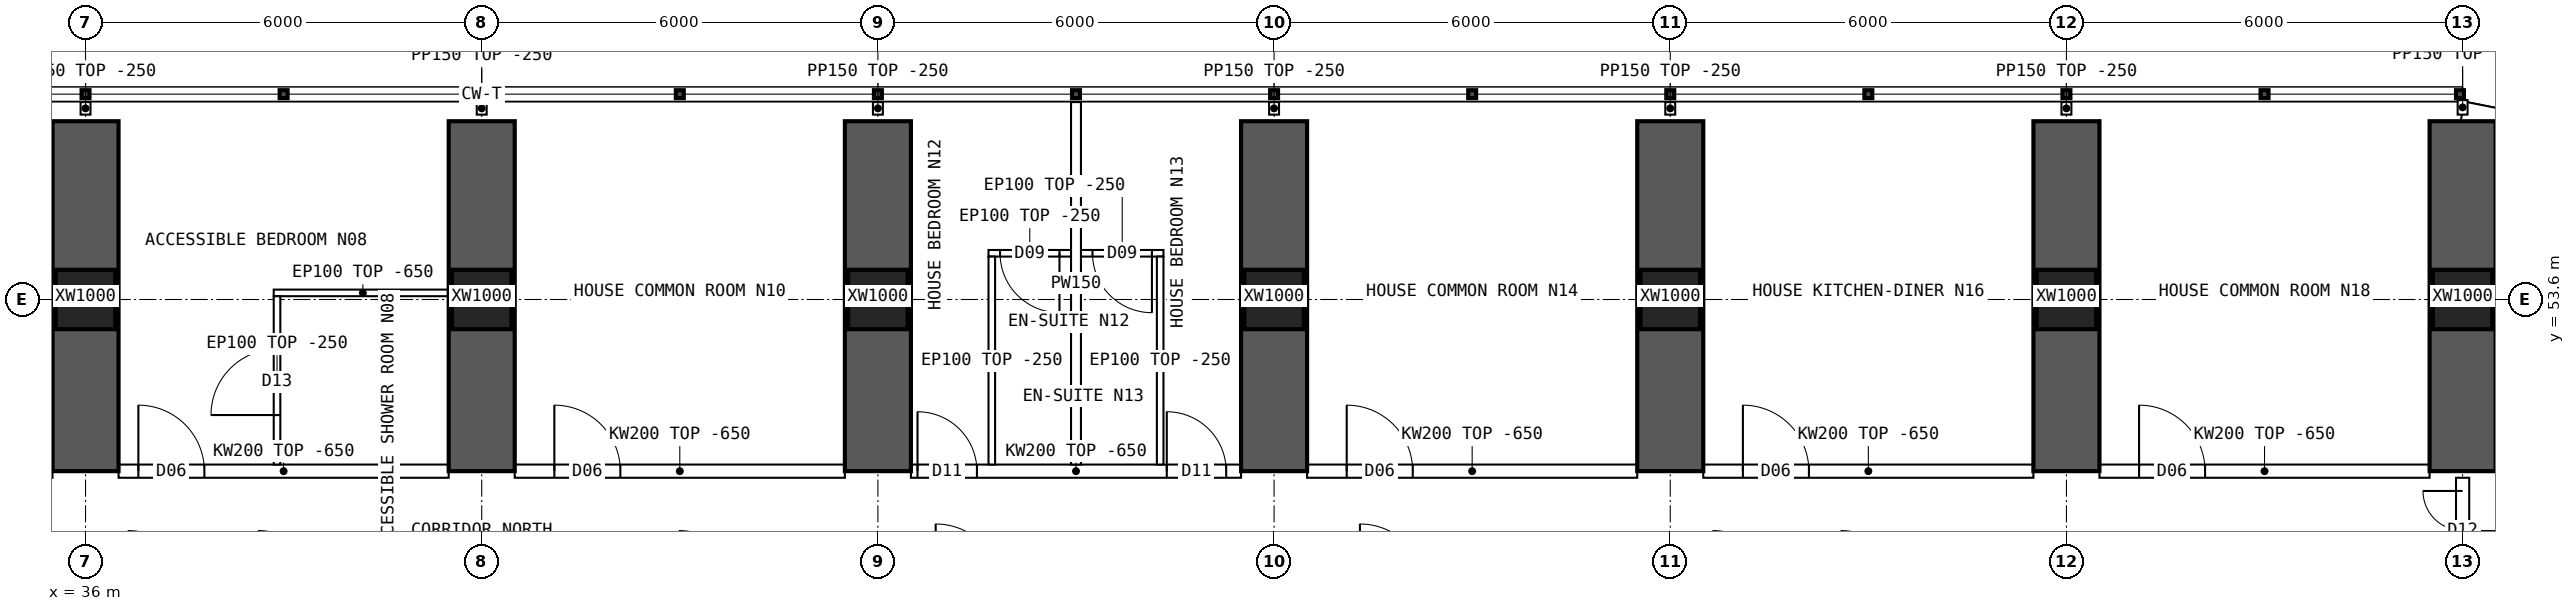
"""IFC4 building model, lengths in metres.
Left out: names, types, materials, properties, quantities, classifications, styles, units other than length and angle.
Written with IfcOpenShell. Run it as: python <this file> out.ifc"""

import sys

from ifc_helpers import new_model, si_unit, direction, frame, frame_2d, origin, origin_2d, place, context, subcontext, project, spatial, polyline, rectangle, hollow_rectangle, outline, extrude, element, fill, save


model = new_model("IFC4")
c1 = context("Model", 3, precision=1e-05, world=origin(), true_north=direction((0.0, 1.0)))
c2 = subcontext(c1, "Body", "Model", "MODEL_VIEW")
j1 = project(units=[si_unit("LENGTHUNIT", "METRE"), si_unit("PLANEANGLEUNIT", "RADIAN")], contexts=[c1])
p1 = place(None, origin())
s1 = spatial("IfcSite", under=j1, at=p1, CompositionType="ELEMENT")
p2 = place(p1, origin())
s2 = spatial("IfcBuilding", under=s1, at=p2, CompositionType="ELEMENT")
p3 = place(p2, frame((0.0, 0.0, 53.95)))
s3 = spatial("IfcBuildingStorey", under=s2, at=p3, CompositionType="ELEMENT", Elevation=53.95)
for number, where, z_axis, x_axis in (
    (1, (36.0, 53.6, 0.0), (0.0, 0.0, 1.0), (1.0, 0.0, 0.0)),
    (2, (42.0, 53.6, 0.0), (0.0, 0.0, 1.0), (1.0, 0.0, 0.0)),
    (3, (48.0, 53.6, 0.0), (0.0, 0.0, 1.0), (1.0, 0.0, 0.0)),
    (4, (54.0, 53.6, 0.0), (0.0, 0.0, 1.0), (1.0, 0.0, 0.0)),
    (5, (60.0, 53.6, 0.0), (0.0, 0.0, 1.0), (1.0, 0.0, 0.0)),
    (6, (66.0, 53.6, 0.0), (0.0, 0.0, 1.0), (1.0, 0.0, 0.0)),
    (7, (72.0, 53.6, 0.0), (0.0, 0.0, 1.0), (1.0, 0.0, 0.0)),
):
    element("IfcColumn", number, at=place(p3, frame(where, z_axis=z_axis, x_axis=x_axis)), inside=s3, PredefinedType="COLUMN", context=c2, shape_type="SweptSolid", body=[
        extrude(hollow_rectangle(XDim=0.9, YDim=0.9, WallThickness=0.09, at=origin_2d()), origin(), (0.0, 0.0, 1.0), 3.75),
    ])
for number, where, z_axis, x_axis in (
    (8, (36.0, 51.0, 0.0), (0.0, 0.0, 1.0), (0.0, 1.0, 0.0)),
    (9, (42.0, 51.0, 0.0), (0.0, 0.0, 1.0), (0.0, 1.0, 0.0)),
    (10, (48.0, 51.0, 0.0), (0.0, 0.0, 1.0), (0.0, 1.0, 0.0)),
    (11, (54.0, 51.0, 0.0), (0.0, 0.0, 1.0), (0.0, 1.0, 0.0)),
    (12, (60.0, 51.0, 0.0), (0.0, 0.0, 1.0), (0.0, 1.0, 0.0)),
    (13, (66.0, 51.0, 0.0), (0.0, 0.0, 1.0), (0.0, 1.0, 0.0)),
    (14, (72.0, 51.0, 0.0), (0.0, 0.0, 1.0), (0.0, 1.0, 0.0)),
):
    element("IfcWall", number, at=place(p3, frame(where, z_axis=z_axis, x_axis=x_axis)), inside=s3, PredefinedType="SHEAR", context=c2, shape_type="SweptSolid", body=[
        extrude(rectangle(XDim=5.3, YDim=1.0, at=frame_2d((2.65, 0.0))), origin(), (0.0, 0.0, 1.0), 3.75),
    ])
p4 = place(p3, frame((75.157, 55.822, 0.0), z_axis=(0.0, 0.0, 1.0), x_axis=(-0.980787251524, 0.195080412259, 0.0)))
e15 = element("IfcWall", 15, at=p4, inside=s3, PredefinedType="SOLIDWALL", context=c2, shape_type="SweptSolid", body=[
    extrude(outline(polyline([(-0.03, -0.15), (3.249, -0.15), (3.189, 0.15), (0.03, 0.15), (-0.03, -0.15)])), origin(), (0.0, 0.0, 1.0), 3.5),
])
p5 = place(p4, frame((0.909, 0.0, 0.9)))
e16 = element("IfcOpeningElement", 16, at=p5, cuts=e15, PredefinedType="OPENING", context=c2, shape_type="SweptSolid", body=[
    extrude(rectangle(XDim=1.4, YDim=1.8, at=frame_2d((0.7, 0.9))), frame((0.0, 0.16, 0.0), z_axis=(0.0, -1.0, 0.0), x_axis=(1.0, 0.0, 0.0)), (0.0, 0.0, 1.0), 0.32),
])
p6 = place(p3, frame((36.5, 51.0, 0.0), z_axis=(0.0, 0.0, 1.0), x_axis=(1.0, 0.0, 0.0)))
e17 = element("IfcWall", 17, at=p6, inside=s3, PredefinedType="SOLIDWALL", context=c2, shape_type="SweptSolid", body=[
    extrude(outline(polyline([(0.0, 0.0), (5.0, 0.0), (5.0, 3.1), (0.0, 3.1), (0.0, 0.0)])), frame((0.0, 0.1, 0.0), z_axis=(0.0, -1.0, 0.0), x_axis=(1.0, 0.0, 0.0)), (0.0, 0.0, 1.0), 0.2),
])
p7 = place(p6, frame((0.3, 0.0, 0.0)))
e18 = element("IfcOpeningElement", 18, at=p7, cuts=e17, PredefinedType="OPENING", context=c2, shape_type="SweptSolid", body=[
    extrude(rectangle(XDim=1.0, YDim=2.1, at=frame_2d((0.5, 1.05))), frame((0.0, 0.11, 0.0), z_axis=(0.0, -1.0, 0.0), x_axis=(1.0, 0.0, 0.0)), (0.0, 0.0, 1.0), 0.22),
])
p8 = place(p3, frame((42.5, 51.0, 0.0), z_axis=(0.0, 0.0, 1.0), x_axis=(1.0, 0.0, 0.0)))
e19 = element("IfcWall", 19, at=p8, inside=s3, PredefinedType="SOLIDWALL", context=c2, shape_type="SweptSolid", body=[
    extrude(outline(polyline([(0.0, 0.0), (5.0, 0.0), (5.0, 3.1), (0.0, 3.1), (0.0, 0.0)])), frame((0.0, 0.1, 0.0), z_axis=(0.0, -1.0, 0.0), x_axis=(1.0, 0.0, 0.0)), (0.0, 0.0, 1.0), 0.2),
])
p9 = place(p8, frame((0.6, 0.0, 0.0)))
e20 = element("IfcOpeningElement", 20, at=p9, cuts=e19, PredefinedType="OPENING", context=c2, shape_type="SweptSolid", body=[
    extrude(rectangle(XDim=1.0, YDim=2.1, at=frame_2d((0.5, 1.05))), frame((0.0, 0.11, 0.0), z_axis=(0.0, -1.0, 0.0), x_axis=(1.0, 0.0, 0.0)), (0.0, 0.0, 1.0), 0.22),
])
p10 = place(p3, frame((48.5, 51.0, 0.0), z_axis=(0.0, 0.0, 1.0), x_axis=(1.0, 0.0, 0.0)))
e21 = element("IfcWall", 21, at=p10, inside=s3, PredefinedType="SOLIDWALL", context=c2, shape_type="SweptSolid", body=[
    extrude(outline(polyline([(0.0, 0.0), (5.0, 0.0), (5.0, 3.1), (0.0, 3.1), (0.0, 0.0)])), frame((0.0, 0.1, 0.0), z_axis=(0.0, -1.0, 0.0), x_axis=(1.0, 0.0, 0.0)), (0.0, 0.0, 1.0), 0.2),
])
p11 = place(p10, frame((0.1, 0.0, 0.0)))
e22 = element("IfcOpeningElement", 22, at=p11, cuts=e21, PredefinedType="OPENING", context=c2, shape_type="SweptSolid", body=[
    extrude(rectangle(XDim=0.9, YDim=2.1, at=frame_2d((0.45, 1.05))), frame((0.0, 0.11, 0.0), z_axis=(0.0, -1.0, 0.0), x_axis=(1.0, 0.0, 0.0)), (0.0, 0.0, 1.0), 0.22),
])
p12 = place(p10, frame((3.875, 0.0, 0.0)))
e23 = element("IfcOpeningElement", 23, at=p12, cuts=e21, PredefinedType="OPENING", context=c2, shape_type="SweptSolid", body=[
    extrude(rectangle(XDim=0.9, YDim=2.1, at=frame_2d((0.45, 1.05))), frame((0.0, 0.11, 0.0), z_axis=(0.0, -1.0, 0.0), x_axis=(1.0, 0.0, 0.0)), (0.0, 0.0, 1.0), 0.22),
])
p13 = place(p3, frame((54.5, 51.0, 0.0), z_axis=(0.0, 0.0, 1.0), x_axis=(1.0, 0.0, 0.0)))
e24 = element("IfcWall", 24, at=p13, inside=s3, PredefinedType="SOLIDWALL", context=c2, shape_type="SweptSolid", body=[
    extrude(outline(polyline([(0.0, 0.0), (5.0, 0.0), (5.0, 3.1), (0.0, 3.1), (0.0, 0.0)])), frame((0.0, 0.1, 0.0), z_axis=(0.0, -1.0, 0.0), x_axis=(1.0, 0.0, 0.0)), (0.0, 0.0, 1.0), 0.2),
])
p14 = place(p13, frame((0.6, 0.0, 0.0)))
e25 = element("IfcOpeningElement", 25, at=p14, cuts=e24, PredefinedType="OPENING", context=c2, shape_type="SweptSolid", body=[
    extrude(rectangle(XDim=1.0, YDim=2.1, at=frame_2d((0.5, 1.05))), frame((0.0, 0.11, 0.0), z_axis=(0.0, -1.0, 0.0), x_axis=(1.0, 0.0, 0.0)), (0.0, 0.0, 1.0), 0.22),
])
p15 = place(p3, frame((60.5, 51.0, 0.0), z_axis=(0.0, 0.0, 1.0), x_axis=(1.0, 0.0, 0.0)))
e26 = element("IfcWall", 26, at=p15, inside=s3, PredefinedType="SOLIDWALL", context=c2, shape_type="SweptSolid", body=[
    extrude(outline(polyline([(0.0, 0.0), (5.0, 0.0), (5.0, 3.1), (0.0, 3.1), (0.0, 0.0)])), frame((0.0, 0.1, 0.0), z_axis=(0.0, -1.0, 0.0), x_axis=(1.0, 0.0, 0.0)), (0.0, 0.0, 1.0), 0.2),
])
p16 = place(p15, frame((0.6, 0.0, 0.0)))
e27 = element("IfcOpeningElement", 27, at=p16, cuts=e26, PredefinedType="OPENING", context=c2, shape_type="SweptSolid", body=[
    extrude(rectangle(XDim=1.0, YDim=2.1, at=frame_2d((0.5, 1.05))), frame((0.0, 0.11, 0.0), z_axis=(0.0, -1.0, 0.0), x_axis=(1.0, 0.0, 0.0)), (0.0, 0.0, 1.0), 0.22),
])
p17 = place(p3, frame((66.5, 51.0, 0.0), z_axis=(0.0, 0.0, 1.0), x_axis=(1.0, 0.0, 0.0)))
e28 = element("IfcWall", 28, at=p17, inside=s3, PredefinedType="SOLIDWALL", context=c2, shape_type="SweptSolid", body=[
    extrude(outline(polyline([(0.0, 0.0), (5.0, 0.0), (5.0, 3.1), (0.0, 3.1), (0.0, 0.0)])), frame((0.0, 0.1, 0.0), z_axis=(0.0, -1.0, 0.0), x_axis=(1.0, 0.0, 0.0)), (0.0, 0.0, 1.0), 0.2),
])
p18 = place(p17, frame((0.6, 0.0, 0.0)))
e29 = element("IfcOpeningElement", 29, at=p18, cuts=e28, PredefinedType="OPENING", context=c2, shape_type="SweptSolid", body=[
    extrude(rectangle(XDim=1.0, YDim=2.1, at=frame_2d((0.5, 1.05))), frame((0.0, 0.11, 0.0), z_axis=(0.0, -1.0, 0.0), x_axis=(1.0, 0.0, 0.0)), (0.0, 0.0, 1.0), 0.22),
])
p19 = place(p3, frame((38.85, 53.7, 0.0), z_axis=(0.0, 0.0, 1.0), x_axis=(1.0, 0.0, 0.0)))
e30 = element("IfcWall", 30, at=p19, inside=s3, PredefinedType="PARTITIONING", context=c2, shape_type="SweptSolid", body=[
    extrude(outline(polyline([(0.0, 0.0), (2.7, 0.0), (2.7, 3.1), (0.0, 3.1), (0.0, 0.0)])), frame((0.0, 0.05, 0.0), z_axis=(0.0, -1.0, 0.0), x_axis=(1.0, 0.0, 0.0)), (0.0, 0.0, 1.0), 0.1),
])
p20 = place(p3, frame((38.9, 53.65, 0.0), z_axis=(0.0, 0.0, 1.0), x_axis=(0.0, -1.0, 0.0)))
e31 = element("IfcWall", 31, at=p20, inside=s3, PredefinedType="PARTITIONING", context=c2, shape_type="SweptSolid", body=[
    extrude(outline(polyline([(0.0, 0.0), (2.55, 0.0), (2.55, 3.1), (2.502, 3.1), (2.5, 3.5), (0.252, 3.5), (0.25, 3.1), (0.0, 3.1), (0.0, 0.0)])), frame((0.0, 0.05, 0.0), z_axis=(0.0, -1.0, 0.0), x_axis=(1.0, 0.0, 0.0)), (0.0, 0.0, 1.0), 0.1),
])
p21 = place(p20, frame((0.8, 0.0, 0.0)))
e32 = element("IfcOpeningElement", 32, at=p21, cuts=e31, PredefinedType="OPENING", context=c2, shape_type="SweptSolid", body=[
    extrude(rectangle(XDim=1.0, YDim=2.1, at=frame_2d((0.5, 1.05))), frame((0.0, 0.06, 0.0), z_axis=(0.0, -1.0, 0.0), x_axis=(1.0, 0.0, 0.0)), (0.0, 0.0, 1.0), 0.12),
])
p22 = place(p3, frame((51.0, 56.59, 0.0), z_axis=(0.0, 0.0, 1.0), x_axis=(0.0, -1.0, 0.0)))
e33 = element("IfcWall", 33, at=p22, inside=s3, PredefinedType="PARTITIONING", context=c2, shape_type="SweptSolid", body=[
    extrude(outline(polyline([(0.0, 0.0), (5.49, 0.0), (5.49, 3.1), (5.442, 3.1), (5.44, 3.5), (3.192, 3.5), (3.19, 3.1), (2.792, 3.1), (2.79, 3.5), (0.0, 3.5), (0.0, 0.0)])), frame((0.0, 0.075, 0.0), z_axis=(0.0, -1.0, 0.0), x_axis=(1.0, 0.0, 0.0)), (0.0, 0.0, 1.0), 0.15),
])
p23 = place(p3, frame((49.675, 54.3, 0.0), z_axis=(0.0, 0.0, 1.0), x_axis=(1.0, 0.0, 0.0)))
e34 = element("IfcWall", 34, at=p23, inside=s3, PredefinedType="PARTITIONING", context=c2, shape_type="SweptSolid", body=[
    extrude(rectangle(XDim=1.25, YDim=0.1, at=frame_2d((0.625, 0.0))), origin(), (0.0, 0.0, 1.0), 3.5),
])
p24 = place(p23, frame((0.175, 0.0, 0.0)))
e35 = element("IfcOpeningElement", 35, at=p24, cuts=e34, PredefinedType="OPENING", context=c2, shape_type="SweptSolid", body=[
    extrude(rectangle(XDim=0.9, YDim=2.1, at=frame_2d((0.45, 1.05))), frame((0.0, 0.06, 0.0), z_axis=(0.0, -1.0, 0.0), x_axis=(1.0, 0.0, 0.0)), (0.0, 0.0, 1.0), 0.12),
])
p25 = place(p3, frame((49.725, 54.25, 0.0), z_axis=(0.0, 0.0, 1.0), x_axis=(0.0, -1.0, 0.0)))
e36 = element("IfcWall", 36, at=p25, inside=s3, PredefinedType="PARTITIONING", context=c2, shape_type="SweptSolid", body=[
    extrude(outline(polyline([(0.0, 0.0), (3.15, 0.0), (3.15, 3.1), (3.102, 3.1), (3.1, 3.5), (0.852, 3.5), (0.85, 3.1), (0.452, 3.1), (0.45, 3.5), (0.0, 3.5), (0.0, 0.0)])), frame((0.0, 0.05, 0.0), z_axis=(0.0, -1.0, 0.0), x_axis=(1.0, 0.0, 0.0)), (0.0, 0.0, 1.0), 0.1),
])
p26 = place(p3, frame((51.075, 54.3, 0.0), z_axis=(0.0, 0.0, 1.0), x_axis=(1.0, 0.0, 0.0)))
e37 = element("IfcWall", 37, at=p26, inside=s3, PredefinedType="PARTITIONING", context=c2, shape_type="SweptSolid", body=[
    extrude(rectangle(XDim=1.25, YDim=0.1, at=frame_2d((0.625, 0.0))), origin(), (0.0, 0.0, 1.0), 3.5),
])
p27 = place(p26, frame((0.175, 0.0, 0.0)))
e38 = element("IfcOpeningElement", 38, at=p27, cuts=e37, PredefinedType="OPENING", context=c2, shape_type="SweptSolid", body=[
    extrude(rectangle(XDim=0.9, YDim=2.1, at=frame_2d((0.45, 1.05))), frame((0.0, 0.06, 0.0), z_axis=(0.0, -1.0, 0.0), x_axis=(1.0, 0.0, 0.0)), (0.0, 0.0, 1.0), 0.12),
])
p28 = place(p3, frame((52.275, 54.25, 0.0), z_axis=(0.0, 0.0, 1.0), x_axis=(0.0, -1.0, 0.0)))
e39 = element("IfcWall", 39, at=p28, inside=s3, PredefinedType="PARTITIONING", context=c2, shape_type="SweptSolid", body=[
    extrude(outline(polyline([(0.0, 0.0), (3.15, 0.0), (3.15, 3.1), (3.102, 3.1), (3.1, 3.5), (0.852, 3.5), (0.85, 3.1), (0.452, 3.1), (0.45, 3.5), (0.0, 3.5), (0.0, 0.0)])), frame((0.0, 0.05, 0.0), z_axis=(0.0, -1.0, 0.0), x_axis=(1.0, 0.0, 0.0)), (0.0, 0.0, 1.0), 0.1),
])
p29 = place(p3, frame((72.0, 49.3, 0.0), z_axis=(0.0, 0.0, 1.0), x_axis=(0.0, 1.0, 0.0)))
e40 = element("IfcWall", 40, at=p29, inside=s3, PredefinedType="SOLIDWALL", context=c2, shape_type="SweptSolid", body=[
    extrude(outline(polyline([(0.0, 0.0), (1.6, 0.0), (1.6, 3.05), (0.0, 3.05), (0.0, 0.0)])), frame((0.0, 0.1, 0.0), z_axis=(0.0, -1.0, 0.0), x_axis=(1.0, 0.0, 0.0)), (0.0, 0.0, 1.0), 0.2),
])
p30 = place(p29, frame((0.2, 0.0, 0.0)))
e41 = element("IfcOpeningElement", 41, at=p30, cuts=e40, PredefinedType="OPENING", context=c2, shape_type="SweptSolid", body=[
    extrude(rectangle(XDim=1.2, YDim=2.1, at=frame_2d((0.6, 1.05))), frame((0.0, 0.11, 0.0), z_axis=(0.0, -1.0, 0.0), x_axis=(1.0, 0.0, 0.0)), (0.0, 0.0, 1.0), 0.22),
])
for number, where, z_axis, x_axis in (
    (42, (36.0, 56.4, 0.0), (0.0, 0.0, 1.0), (0.0, 1.0, 0.0)),
    (43, (42.0, 56.4, 0.0), (0.0, 0.0, 1.0), (0.0, 1.0, 0.0)),
    (44, (48.0, 56.4, 0.0), (0.0, 0.0, 1.0), (0.0, 1.0, 0.0)),
    (45, (54.0, 56.4, 0.0), (0.0, 0.0, 1.0), (0.0, 1.0, 0.0)),
    (46, (60.0, 56.4, 0.0), (0.0, 0.0, 1.0), (0.0, 1.0, 0.0)),
    (47, (66.0, 56.4, 0.0), (0.0, 0.0, 1.0), (0.0, 1.0, 0.0)),
):
    element("IfcWall", number, at=place(p3, frame(where, z_axis=z_axis, x_axis=x_axis)), inside=s3, PredefinedType="PARTITIONING", context=c2, shape_type="SweptSolid", body=[
        extrude(rectangle(XDim=0.19, YDim=0.15, at=frame_2d((0.095, 0.0))), origin(), (0.0, 0.0, 1.0), 3.5),
    ])
p31 = place(p3, frame((72.0, 56.4, 0.0), z_axis=(0.0, 0.0, 1.0), x_axis=(0.0, 1.0, 0.0)))
e48 = element("IfcWall", 48, at=p31, inside=s3, PredefinedType="PARTITIONING", context=c2, shape_type="SweptSolid", body=[
    extrude(rectangle(XDim=0.22, YDim=0.15, at=frame_2d((0.11, 0.0))), origin(), (0.0, 0.0, 1.0), 3.5),
])
p32 = place(p21, origin())
e49 = element("IfcDoor", 49, at=p32, inside=s3, OperationType="SINGLE_SWING_RIGHT", PredefinedType="DOOR", context=c2, shape_type="SweptSolid", body=[
    extrude(rectangle(XDim=1.0, YDim=2.1, at=frame_2d((0.5, 1.05))), frame((0.0, 0.025, 0.0), z_axis=(0.0, -1.0, 0.0), x_axis=(1.0, 0.0, 0.0)), (0.0, 0.0, 1.0), 0.05),
])
fill(e32, e49)
p33 = place(p7, origin())
e50 = element("IfcDoor", 50, at=p33, inside=s3, OperationType="SINGLE_SWING_LEFT", PredefinedType="DOOR", context=c2, shape_type="SweptSolid", body=[
    extrude(rectangle(XDim=1.0, YDim=2.1, at=frame_2d((0.5, 1.05))), frame((0.0, 0.025, 0.0), z_axis=(0.0, -1.0, 0.0), x_axis=(1.0, 0.0, 0.0)), (0.0, 0.0, 1.0), 0.05),
])
fill(e18, e50)
p34 = place(p9, origin())
e51 = element("IfcDoor", 51, at=p34, inside=s3, OperationType="SINGLE_SWING_LEFT", PredefinedType="DOOR", context=c2, shape_type="SweptSolid", body=[
    extrude(rectangle(XDim=1.0, YDim=2.1, at=frame_2d((0.5, 1.05))), frame((0.0, 0.025, 0.0), z_axis=(0.0, -1.0, 0.0), x_axis=(1.0, 0.0, 0.0)), (0.0, 0.0, 1.0), 0.05),
])
fill(e20, e51)
p35 = place(p24, origin())
e52 = element("IfcDoor", 52, at=p35, inside=s3, OperationType="SINGLE_SWING_RIGHT", PredefinedType="DOOR", context=c2, shape_type="SweptSolid", body=[
    extrude(rectangle(XDim=0.9, YDim=2.1, at=frame_2d((0.45, 1.05))), frame((0.0, 0.025, 0.0), z_axis=(0.0, -1.0, 0.0), x_axis=(1.0, 0.0, 0.0)), (0.0, 0.0, 1.0), 0.05),
])
fill(e35, e52)
p36 = place(p11, origin())
e53 = element("IfcDoor", 53, at=p36, inside=s3, OperationType="SINGLE_SWING_LEFT", PredefinedType="DOOR", context=c2, shape_type="SweptSolid", body=[
    extrude(rectangle(XDim=0.9, YDim=2.1, at=frame_2d((0.45, 1.05))), frame((0.0, 0.025, 0.0), z_axis=(0.0, -1.0, 0.0), x_axis=(1.0, 0.0, 0.0)), (0.0, 0.0, 1.0), 0.05),
])
fill(e22, e53)
p37 = place(p27, origin())
e54 = element("IfcDoor", 54, at=p37, inside=s3, OperationType="SINGLE_SWING_RIGHT", PredefinedType="DOOR", context=c2, shape_type="SweptSolid", body=[
    extrude(rectangle(XDim=0.9, YDim=2.1, at=frame_2d((0.45, 1.05))), frame((0.0, 0.025, 0.0), z_axis=(0.0, -1.0, 0.0), x_axis=(1.0, 0.0, 0.0)), (0.0, 0.0, 1.0), 0.05),
])
fill(e38, e54)
p38 = place(p12, origin())
e55 = element("IfcDoor", 55, at=p38, inside=s3, OperationType="SINGLE_SWING_LEFT", PredefinedType="DOOR", context=c2, shape_type="SweptSolid", body=[
    extrude(rectangle(XDim=0.9, YDim=2.1, at=frame_2d((0.45, 1.05))), frame((0.0, 0.025, 0.0), z_axis=(0.0, -1.0, 0.0), x_axis=(1.0, 0.0, 0.0)), (0.0, 0.0, 1.0), 0.05),
])
fill(e23, e55)
p39 = place(p14, origin())
e56 = element("IfcDoor", 56, at=p39, inside=s3, OperationType="SINGLE_SWING_LEFT", PredefinedType="DOOR", context=c2, shape_type="SweptSolid", body=[
    extrude(rectangle(XDim=1.0, YDim=2.1, at=frame_2d((0.5, 1.05))), frame((0.0, 0.025, 0.0), z_axis=(0.0, -1.0, 0.0), x_axis=(1.0, 0.0, 0.0)), (0.0, 0.0, 1.0), 0.05),
])
fill(e25, e56)
p40 = place(p16, origin())
e57 = element("IfcDoor", 57, at=p40, inside=s3, OperationType="SINGLE_SWING_LEFT", PredefinedType="DOOR", context=c2, shape_type="SweptSolid", body=[
    extrude(rectangle(XDim=1.0, YDim=2.1, at=frame_2d((0.5, 1.05))), frame((0.0, 0.025, 0.0), z_axis=(0.0, -1.0, 0.0), x_axis=(1.0, 0.0, 0.0)), (0.0, 0.0, 1.0), 0.05),
])
fill(e27, e57)
p41 = place(p18, origin())
e58 = element("IfcDoor", 58, at=p41, inside=s3, OperationType="SINGLE_SWING_LEFT", PredefinedType="DOOR", context=c2, shape_type="SweptSolid", body=[
    extrude(rectangle(XDim=1.0, YDim=2.1, at=frame_2d((0.5, 1.05))), frame((0.0, 0.025, 0.0), z_axis=(0.0, -1.0, 0.0), x_axis=(1.0, 0.0, 0.0)), (0.0, 0.0, 1.0), 0.05),
])
fill(e29, e58)
p42 = place(p30, origin())
e59 = element("IfcDoor", 59, at=p42, inside=s3, OperationType="DOUBLE_DOOR_SINGLE_SWING", PredefinedType="DOOR", context=c2, shape_type="SweptSolid", body=[
    extrude(rectangle(XDim=1.2, YDim=2.1, at=frame_2d((0.6, 1.05))), frame((0.0, 0.025, 0.0), z_axis=(0.0, -1.0, 0.0), x_axis=(1.0, 0.0, 0.0)), (0.0, 0.0, 1.0), 0.05),
])
fill(e41, e59)
save(model, sys.argv[1])
